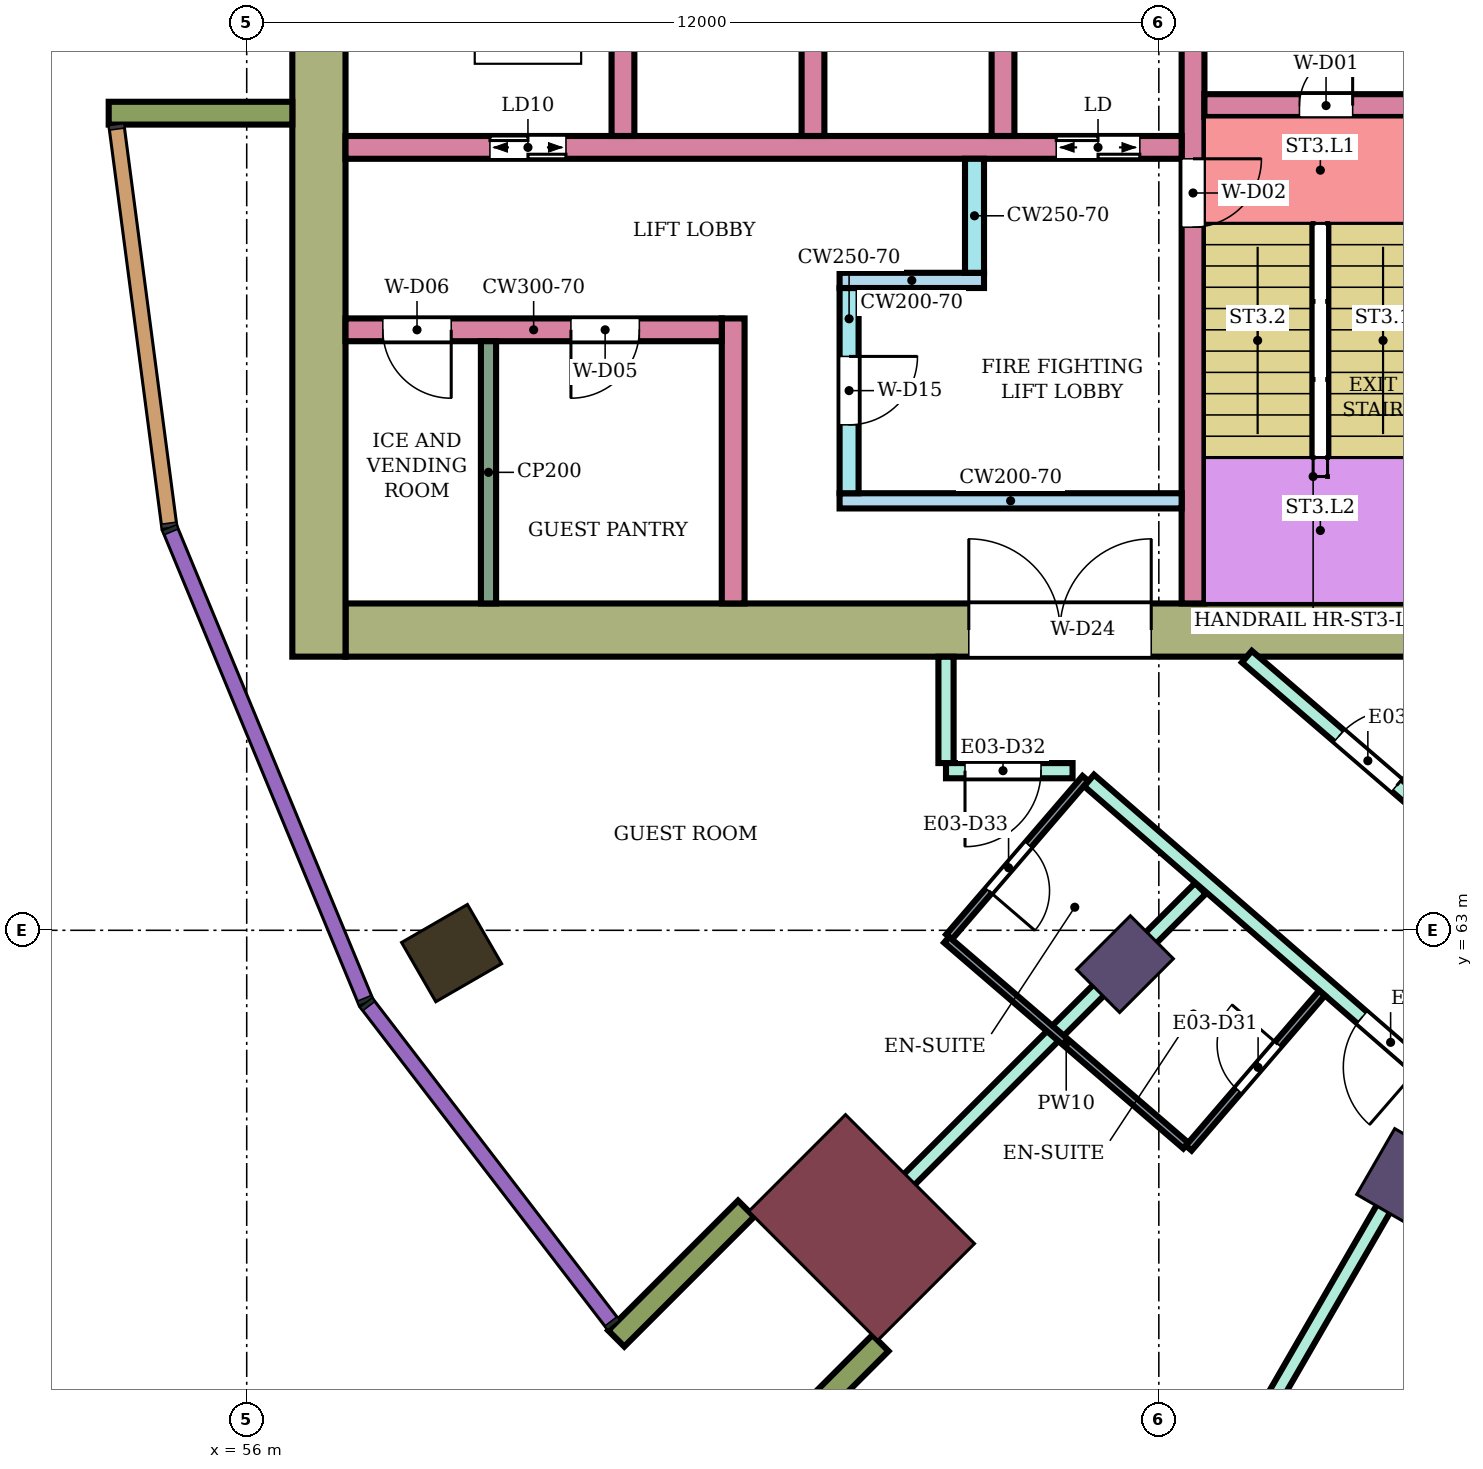
"""IFC4 building model, lengths in metres.
Left out: names, types, materials, properties, quantities, classifications, styles, units other than length and angle.
Written with IfcOpenShell. Run it as: python <this file> out.ifc"""

import sys

from ifc_helpers import new_model, si_unit, direction, frame, frame_2d, origin, origin_2d, place, context, subcontext, project, spatial, rectangle, extrude, element, fill, save


model = new_model("IFC4")
c1 = context("Model", 3, precision=1e-05, world=origin(), true_north=direction((0.0, 1.0)))
c2 = subcontext(c1, "Body", "Model", "MODEL_VIEW")
j1 = project(units=[si_unit("LENGTHUNIT", "METRE"), si_unit("PLANEANGLEUNIT", "RADIAN")], contexts=[c1])
p1 = place(None, origin())
s1 = spatial("IfcSite", under=j1, at=p1, CompositionType="ELEMENT")
p2 = place(p1, origin())
s2 = spatial("IfcBuilding", under=s1, at=p2, CompositionType="ELEMENT")
p3 = place(p2, frame((0.0, 0.0, 141.9)))
s3 = spatial("IfcBuildingStorey", under=s2, at=p3, CompositionType="ELEMENT", Elevation=141.9)
p4 = place(p3, frame((58.696, 62.7, 0.0), z_axis=(0.0, 0.0, 1.0), x_axis=(-0.866025403784, -0.5, 0.0)))
e1 = element("IfcColumn", 1, at=p4, inside=s3, PredefinedType="COLUMN", context=c2, shape_type="SweptSolid", body=[
    extrude(rectangle(XDim=1.0, YDim=0.9, at=origin_2d()), origin(), (0.0, 0.0, 1.0), 3.9),
])
for number, where, z_axis, x_axis in (
    (2, (67.555, 62.555, 0.0), (0.0, 0.0, 1.0), (-0.707, -0.707, 0.0)),
    (3, (71.2, 59.758, 0.0), (0.0, 0.0, 1.0), (-0.5, -0.866, 0.0)),
):
    element("IfcColumn", number, at=place(p3, frame(where, z_axis=z_axis, x_axis=x_axis)), inside=s3, PredefinedType="COLUMN", context=c2, shape_type="SweptSolid", body=[
        extrude(rectangle(XDim=1.0, YDim=0.8, at=origin_2d()), origin(), (0.0, 0.0, 1.0), 3.9),
    ])
p5 = place(p3, frame((64.09, 59.09, 0.0), z_axis=(0.0, 0.0, 1.0), x_axis=(-0.707106781187, -0.707106781187, 0.0)))
e4 = element("IfcColumn", 4, at=p5, inside=s3, PredefinedType="COLUMN", context=c2, shape_type="SweptSolid", body=[
    extrude(rectangle(XDim=1.8, YDim=2.4, at=origin_2d()), origin(), (0.0, 0.0, 1.0), 3.9),
])
p6 = place(p3, frame((72.1, 66.95, 0.0), z_axis=(0.0, 0.0, 1.0), x_axis=(-1.0, 0.0, 0.0)))
e5 = element("IfcWall", 5, at=p6, inside=s3, PredefinedType="SHEAR", context=c2, shape_type="SweptSolid", body=[
    extrude(rectangle(XDim=14.8, YDim=0.7, at=frame_2d((7.4, 0.0))), origin(), (0.0, 0.0, 1.0), 3.58),
])
p7 = place(p6, frame((4.2, 0.0, 0.0)))
e6 = element("IfcOpeningElement", 6, at=p7, cuts=e5, PredefinedType="OPENING", context=c2, shape_type="SweptSolid", body=[
    extrude(rectangle(XDim=2.4, YDim=2.4, at=frame_2d((1.2, 1.2))), frame((0.0, 0.36, 0.0), z_axis=(0.0, -1.0, 0.0), x_axis=(1.0, 0.0, 0.0)), (0.0, 0.0, 1.0), 0.72),
])
p8 = place(p3, frame((56.95, 83.4, 0.0), z_axis=(0.0, 0.0, 1.0), x_axis=(0.0, -1.0, 0.0)))
e7 = element("IfcWall", 7, at=p8, inside=s3, PredefinedType="SHEAR", context=c2, shape_type="SweptSolid", body=[
    extrude(rectangle(XDim=16.8, YDim=0.7, at=frame_2d((8.4, 0.0))), origin(), (0.0, 0.0, 1.0), 3.58),
])
p9 = place(p3, frame((68.45, 75.0, 0.0), z_axis=(0.0, 0.0, 1.0), x_axis=(0.0, -1.0, 0.0)))
e8 = element("IfcWall", 8, at=p9, inside=s3, PredefinedType="SHEAR", context=c2, shape_type="SweptSolid", body=[
    extrude(rectangle(XDim=7.7, YDim=0.3, at=frame_2d((3.85, 0.0))), origin(), (0.0, 0.0, 1.0), 3.58),
])
p10 = place(p9, frame((1.85, 0.0, 0.0)))
e9 = element("IfcOpeningElement", 9, at=p10, cuts=e8, PredefinedType="OPENING", context=c2, shape_type="SweptSolid", body=[
    extrude(rectangle(XDim=0.9, YDim=2.1, at=frame_2d((0.45, 1.05))), frame((0.0, 0.16, 0.0), z_axis=(0.0, -1.0, 0.0), x_axis=(1.0, 0.0, 0.0)), (0.0, 0.0, 1.0), 0.32),
])
p11 = place(p3, frame((71.65, 73.85, 0.0), z_axis=(0.0, 0.0, 1.0), x_axis=(-1.0, 0.0, 0.0)))
e10 = element("IfcWall", 10, at=p11, inside=s3, PredefinedType="SHEAR", context=c2, shape_type="SweptSolid", body=[
    extrude(rectangle(XDim=3.05, YDim=0.3, at=frame_2d((1.525, 0.0))), origin(), (0.0, 0.0, 1.0), 3.58),
])
p12 = place(p11, frame((1.1, 0.0, 0.0)))
e11 = element("IfcOpeningElement", 11, at=p12, cuts=e10, PredefinedType="OPENING", context=c2, shape_type="SweptSolid", body=[
    extrude(rectangle(XDim=0.7, YDim=2.0, at=frame_2d((0.35, 1.0))), frame((0.0, 0.16, 0.0), z_axis=(0.0, -1.0, 0.0), x_axis=(1.0, 0.0, 0.0)), (0.0, 0.0, 1.0), 0.32),
])
p13 = place(p3, frame((68.3, 73.3, 0.0), z_axis=(0.0, 0.0, 1.0), x_axis=(-1.0, 0.0, 0.0)))
e12 = element("IfcWall", 12, at=p13, inside=s3, PredefinedType="SHEAR", context=c2, shape_type="SweptSolid", body=[
    extrude(rectangle(XDim=11.0, YDim=0.3, at=frame_2d((5.5, 0.0))), origin(), (0.0, 0.0, 1.0), 3.58),
])
p14 = place(p13, frame((0.55, 0.0, 0.0)))
e13 = element("IfcOpeningElement", 13, at=p14, cuts=e12, PredefinedType="OPENING", context=c2, shape_type="SweptSolid", body=[
    extrude(rectangle(XDim=1.1, YDim=2.1, at=frame_2d((0.55, 1.05))), frame((0.0, 0.16, 0.0), z_axis=(0.0, -1.0, 0.0), x_axis=(1.0, 0.0, 0.0)), (0.0, 0.0, 1.0), 0.32),
])
p15 = place(p13, frame((8.1, 0.0, 0.0)))
e14 = element("IfcOpeningElement", 14, at=p15, cuts=e12, PredefinedType="OPENING", context=c2, shape_type="SweptSolid", body=[
    extrude(rectangle(XDim=1.0, YDim=2.1, at=frame_2d((0.5, 1.05))), frame((0.0, 0.16, 0.0), z_axis=(0.0, -1.0, 0.0), x_axis=(1.0, 0.0, 0.0)), (0.0, 0.0, 1.0), 0.32),
])
for number, where, z_axis, x_axis in (
    (15, (65.95, 76.0, 0.0), (0.0, 0.0, 1.0), (0.0, -1.0, 0.0)),
    (16, (63.45, 76.0, 0.0), (0.0, 0.0, 1.0), (0.0, -1.0, 0.0)),
    (17, (60.95, 76.0, 0.0), (0.0, 0.0, 1.0), (0.0, -1.0, 0.0)),
):
    element("IfcWall", number, at=place(p3, frame(where, z_axis=z_axis, x_axis=x_axis)), inside=s3, PredefinedType="SHEAR", context=c2, shape_type="SweptSolid", body=[
        extrude(rectangle(XDim=2.55, YDim=0.3, at=frame_2d((1.275, 0.0))), origin(), (0.0, 0.0, 1.0), 3.58),
    ])
p16 = place(p3, frame((68.3, 68.65, 0.0), z_axis=(0.0, 0.0, 1.0), x_axis=(-1.0, 0.0, 0.0)))
e18 = element("IfcWall", 18, at=p16, inside=s3, PredefinedType="SHEAR", context=c2, shape_type="SweptSolid", body=[
    extrude(rectangle(XDim=4.5, YDim=0.2, at=frame_2d((2.25, 0.0))), origin(), (0.0, 0.0, 1.0), 3.58),
])
p17 = place(p3, frame((63.925, 71.45, 0.0), z_axis=(0.0, 0.0, 1.0), x_axis=(0.0, -1.0, 0.0)))
e19 = element("IfcWall", 19, at=p17, inside=s3, PredefinedType="SHEAR", context=c2, shape_type="SweptSolid", body=[
    extrude(rectangle(XDim=2.7, YDim=0.25, at=frame_2d((1.35, 0.0))), origin(), (0.0, 0.0, 1.0), 3.58),
])
p18 = place(p17, frame((0.9, 0.0, 0.0)))
e20 = element("IfcOpeningElement", 20, at=p18, cuts=e19, PredefinedType="OPENING", context=c2, shape_type="SweptSolid", body=[
    extrude(rectangle(XDim=0.9, YDim=2.1, at=frame_2d((0.45, 1.05))), frame((0.0, 0.135, 0.0), z_axis=(0.0, -1.0, 0.0), x_axis=(1.0, 0.0, 0.0)), (0.0, 0.0, 1.0), 0.27),
])
p19 = place(p3, frame((65.7, 71.55, 0.0), z_axis=(0.0, 0.0, 1.0), x_axis=(-1.0, 0.0, 0.0)))
e21 = element("IfcWall", 21, at=p19, inside=s3, PredefinedType="SHEAR", context=c2, shape_type="SweptSolid", body=[
    extrude(rectangle(XDim=1.9, YDim=0.2, at=frame_2d((0.95, 0.0))), origin(), (0.0, 0.0, 1.0), 3.58),
])
p20 = place(p3, frame((65.575, 73.15, 0.0), z_axis=(0.0, 0.0, 1.0), x_axis=(0.0, -1.0, 0.0)))
e22 = element("IfcWall", 22, at=p20, inside=s3, PredefinedType="SHEAR", context=c2, shape_type="SweptSolid", body=[
    extrude(rectangle(XDim=1.5, YDim=0.25, at=frame_2d((0.75, 0.0))), origin(), (0.0, 0.0, 1.0), 3.58),
])
p21 = place(p3, frame((62.4, 71.05, 0.0), z_axis=(0.0, 0.0, 1.0), x_axis=(0.0, -1.0, 0.0)))
e23 = element("IfcWall", 23, at=p21, inside=s3, PredefinedType="SHEAR", context=c2, shape_type="SweptSolid", body=[
    extrude(rectangle(XDim=3.75, YDim=0.3, at=frame_2d((1.875, 0.0))), origin(), (0.0, 0.0, 1.0), 3.58),
])
p22 = place(p3, frame((62.25, 70.9, 0.0), z_axis=(0.0, 0.0, 1.0), x_axis=(-1.0, 0.0, 0.0)))
e24 = element("IfcWall", 24, at=p22, inside=s3, PredefinedType="SHEAR", context=c2, shape_type="SweptSolid", body=[
    extrude(rectangle(XDim=4.95, YDim=0.3, at=frame_2d((2.475, 0.0))), origin(), (0.0, 0.0, 1.0), 3.58),
])
p23 = place(p22, frame((1.084, 0.0, 0.0)))
e25 = element("IfcOpeningElement", 25, at=p23, cuts=e24, PredefinedType="OPENING", context=c2, shape_type="SweptSolid", body=[
    extrude(rectangle(XDim=0.9, YDim=2.1, at=frame_2d((0.45, 1.05))), frame((0.0, 0.16, 0.0), z_axis=(0.0, -1.0, 0.0), x_axis=(1.0, 0.0, 0.0)), (0.0, 0.0, 1.0), 0.32),
])
p24 = place(p22, frame((3.56, 0.0, 0.0)))
e26 = element("IfcOpeningElement", 26, at=p24, cuts=e24, PredefinedType="OPENING", context=c2, shape_type="SweptSolid", body=[
    extrude(rectangle(XDim=0.9, YDim=2.1, at=frame_2d((0.45, 1.05))), frame((0.0, 0.16, 0.0), z_axis=(0.0, -1.0, 0.0), x_axis=(1.0, 0.0, 0.0)), (0.0, 0.0, 1.0), 0.32),
])
for number, where, z_axis, x_axis in (
    (27, (56.6, 73.75, 0.0), (0.0, 0.0, 1.0), (-1.0, 0.0, 0.0)),
    (28, (62.57, 59.338, 0.0), (0.0, 0.0, 1.0), (-0.707, -0.707, 0.0)),
    (29, (64.338, 57.57, 0.0), (0.0, 0.0, 1.0), (-0.707, -0.707, 0.0)),
):
    element("IfcWall", number, at=place(p3, frame(where, z_axis=z_axis, x_axis=x_axis)), inside=s3, PredefinedType="NOTDEFINED", context=c2, shape_type="SweptSolid", body=[
        extrude(rectangle(XDim=2.416, YDim=0.3, at=frame_2d((1.208, 0.0))), origin(), (0.0, 0.0, 1.0), 3.9),
    ])
p25 = place(p3, frame((63.593, 58.599, 0.0), z_axis=(0.0, 0.0, 1.0), x_axis=(0.707228748718, 0.706984792613, 0.0)))
e30 = element("IfcWall", 30, at=p25, inside=s3, PredefinedType="PARTITIONING", context=c2, shape_type="SweptSolid", body=[
    extrude(rectangle(XDim=7.005, YDim=0.2, at=frame_2d((3.503, 0.0))), origin(), (0.0, 0.0, 1.0), 3.45),
])
p26 = place(p3, frame((65.2, 65.2, 0.0), z_axis=(0.0, 0.0, 1.0), x_axis=(0.0, 1.0, 0.0)))
e31 = element("IfcWall", 31, at=p26, inside=s3, PredefinedType="PARTITIONING", context=c2, shape_type="SweptSolid", body=[
    extrude(rectangle(XDim=1.399, YDim=0.2, at=frame_2d((0.7, 0.0))), origin(), (0.0, 0.0, 1.0), 3.45),
])
p27 = place(p3, frame((65.2, 65.1, 0.0), z_axis=(0.0, 0.0, 1.0), x_axis=(1.0, 0.0, 0.0)))
e32 = element("IfcWall", 32, at=p27, inside=s3, PredefinedType="PARTITIONING", context=c2, shape_type="SweptSolid", body=[
    extrude(rectangle(XDim=1.665, YDim=0.2, at=frame_2d((0.833, 0.0))), origin(), (0.0, 0.0, 1.0), 3.45),
])
p28 = place(p27, frame((0.25, 0.0, 0.0)))
e33 = element("IfcOpeningElement", 33, at=p28, cuts=e32, PredefinedType="OPENING", context=c2, shape_type="SweptSolid", body=[
    extrude(rectangle(XDim=1.0, YDim=2.1, at=frame_2d((0.5, 1.05))), frame((0.0, 0.11, 0.0), z_axis=(0.0, -1.0, 0.0), x_axis=(1.0, 0.0, 0.0)), (0.0, 0.0, 1.0), 0.22),
])
p29 = place(p3, frame((67.082, 64.972, 0.0), z_axis=(0.0, 0.0, 1.0), x_axis=(0.755031061605, -0.65568902386, 0.0)))
e34 = element("IfcWall", 34, at=p29, inside=s3, PredefinedType="PARTITIONING", context=c2, shape_type="SweptSolid", body=[
    extrude(rectangle(XDim=6.186, YDim=0.2, at=frame_2d((3.093, 0.0))), origin(), (0.0, 0.0, 1.0), 3.45),
])
p30 = place(p29, frame((4.755, 0.0, 0.0)))
e35 = element("IfcOpeningElement", 35, at=p30, cuts=e34, PredefinedType="OPENING", context=c2, shape_type="SweptSolid", body=[
    extrude(rectangle(XDim=1.0, YDim=2.1, at=frame_2d((0.5, 1.05))), frame((0.0, 0.11, 0.0), z_axis=(0.0, -1.0, 0.0), x_axis=(1.0, 0.0, 0.0)), (0.0, 0.0, 1.0), 0.22),
])
p31 = place(p3, frame((67.097, 52.661, 0.0), z_axis=(0.0, 0.0, 1.0), x_axis=(0.500236379769, 0.865888886841, 0.0)))
e36 = element("IfcWall", 36, at=p31, inside=s3, PredefinedType="PARTITIONING", context=c2, shape_type="SweptSolid", body=[
    extrude(rectangle(XDim=9.375, YDim=0.2, at=frame_2d((4.688, 0.0))), origin(), (0.0, 0.0, 1.0), 3.45),
])
p32 = place(p3, frame((69.158, 66.6, 0.0), z_axis=(0.0, 0.0, 1.0), x_axis=(0.757976058094, -0.652282373943, 0.0)))
e37 = element("IfcWall", 37, at=p32, inside=s3, PredefinedType="PARTITIONING", context=c2, shape_type="SweptSolid", body=[
    extrude(rectangle(XDim=5.16, YDim=0.2, at=frame_2d((2.58, 0.0))), origin(), (0.0, 0.0, 1.0), 3.45),
])
p33 = place(p32, frame((1.6, 0.0, 0.0)))
e38 = element("IfcOpeningElement", 38, at=p33, cuts=e37, PredefinedType="OPENING", context=c2, shape_type="SweptSolid", body=[
    extrude(rectangle(XDim=1.0, YDim=2.1, at=frame_2d((0.5, 1.05))), frame((0.0, 0.11, 0.0), z_axis=(0.0, -1.0, 0.0), x_axis=(1.0, 0.0, 0.0)), (0.0, 0.0, 1.0), 0.22),
])
p34 = place(p3, frame((65.24, 62.913, 0.0), z_axis=(0.0, 0.0, 1.0), x_axis=(0.652069888227, 0.758158862553, 0.0)))
e39 = element("IfcWall", 39, at=p34, inside=s3, PredefinedType="PARTITIONING", context=c2, shape_type="SweptSolid", body=[
    extrude(rectangle(XDim=2.75, YDim=0.1, at=frame_2d((1.375, 0.0))), origin(), (0.0, 0.0, 1.0), 3.45),
])
p35 = place(p34, frame((0.8, 0.0, 0.0)))
e40 = element("IfcOpeningElement", 40, at=p35, cuts=e39, PredefinedType="OPENING", context=c2, shape_type="SweptSolid", body=[
    extrude(rectangle(XDim=0.8, YDim=2.1, at=frame_2d((0.4, 1.05))), frame((0.0, 0.06, 0.0), z_axis=(0.0, -1.0, 0.0), x_axis=(1.0, 0.0, 0.0)), (0.0, 0.0, 1.0), 0.12),
])
p36 = place(p3, frame((65.208, 62.875, 0.0), z_axis=(0.0, 0.0, 1.0), x_axis=(0.757943251005, -0.652320495045, 0.0)))
e41 = element("IfcWall", 41, at=p36, inside=s3, PredefinedType="PARTITIONING", context=c2, shape_type="SweptSolid", body=[
    extrude(rectangle(XDim=4.151, YDim=0.1, at=frame_2d((2.076, 0.0))), origin(), (0.0, 0.0, 1.0), 3.45),
])
p37 = place(p3, frame((68.393, 60.135, 0.0), z_axis=(0.0, 0.0, 1.0), x_axis=(0.652061182569, 0.758166349944, 0.0)))
e42 = element("IfcWall", 42, at=p37, inside=s3, PredefinedType="PARTITIONING", context=c2, shape_type="SweptSolid", body=[
    extrude(rectangle(XDim=2.69, YDim=0.1, at=frame_2d((1.345, 0.0))), origin(), (0.0, 0.0, 1.0), 3.45),
])
p38 = place(p37, frame((1.0, 0.0, 0.0)))
e43 = element("IfcOpeningElement", 43, at=p38, cuts=e42, PredefinedType="OPENING", context=c2, shape_type="SweptSolid", body=[
    extrude(rectangle(XDim=0.8, YDim=2.1, at=frame_2d((0.4, 1.05))), frame((0.0, 0.06, 0.0), z_axis=(0.0, -1.0, 0.0), x_axis=(1.0, 0.0, 0.0)), (0.0, 0.0, 1.0), 0.12),
])
p39 = place(p3, frame((59.181, 70.75, 0.0), z_axis=(0.0, 0.0, 1.0), x_axis=(0.0, -1.0, 0.0)))
e44 = element("IfcWall", 44, at=p39, inside=s3, PredefinedType="PARTITIONING", context=c2, shape_type="SweptSolid", body=[
    extrude(rectangle(XDim=3.45, YDim=0.2, at=frame_2d((1.725, 0.0))), origin(), (0.0, 0.0, 1.0), 3.58),
])
p40 = place(p30, frame((1.0, 0.0, 0.0), z_axis=(0.0, 0.0, 1.0), x_axis=(-1.0, 0.0, 0.0)))
e45 = element("IfcDoor", 45, at=p40, inside=s3, OperationType="SINGLE_SWING_LEFT", PredefinedType="DOOR", context=c2, shape_type="SweptSolid", body=[
    extrude(rectangle(XDim=1.0, YDim=2.1, at=frame_2d((0.5, 1.05))), frame((0.0, 0.025, 0.0), z_axis=(0.0, -1.0, 0.0), x_axis=(1.0, 0.0, 0.0)), (0.0, 0.0, 1.0), 0.05),
])
fill(e35, e45)
p41 = place(p38, origin())
e46 = element("IfcDoor", 46, at=p41, inside=s3, OperationType="SINGLE_SWING_RIGHT", PredefinedType="DOOR", context=c2, shape_type="SweptSolid", body=[
    extrude(rectangle(XDim=0.8, YDim=2.1, at=frame_2d((0.4, 1.05))), frame((0.0, 0.025, 0.0), z_axis=(0.0, -1.0, 0.0), x_axis=(1.0, 0.0, 0.0)), (0.0, 0.0, 1.0), 0.05),
])
fill(e43, e46)
p42 = place(p28, frame((1.0, 0.0, 0.0), z_axis=(0.0, 0.0, 1.0), x_axis=(-1.0, 0.0, 0.0)))
e47 = element("IfcDoor", 47, at=p42, inside=s3, OperationType="SINGLE_SWING_RIGHT", PredefinedType="DOOR", context=c2, shape_type="SweptSolid", body=[
    extrude(rectangle(XDim=1.0, YDim=2.1, at=frame_2d((0.5, 1.05))), frame((0.0, 0.025, 0.0), z_axis=(0.0, -1.0, 0.0), x_axis=(1.0, 0.0, 0.0)), (0.0, 0.0, 1.0), 0.05),
])
fill(e33, e47)
p43 = place(p35, frame((0.8, 0.0, 0.0), z_axis=(0.0, 0.0, 1.0), x_axis=(-1.0, 0.0, 0.0)))
e48 = element("IfcDoor", 48, at=p43, inside=s3, OperationType="SINGLE_SWING_RIGHT", PredefinedType="DOOR", context=c2, shape_type="SweptSolid", body=[
    extrude(rectangle(XDim=0.8, YDim=2.1, at=frame_2d((0.4, 1.05))), frame((0.0, 0.025, 0.0), z_axis=(0.0, -1.0, 0.0), x_axis=(1.0, 0.0, 0.0)), (0.0, 0.0, 1.0), 0.05),
])
fill(e40, e48)
p44 = place(p33, origin())
e49 = element("IfcDoor", 49, at=p44, inside=s3, OperationType="SINGLE_SWING_RIGHT", PredefinedType="DOOR", context=c2, shape_type="SweptSolid", body=[
    extrude(rectangle(XDim=1.0, YDim=2.1, at=frame_2d((0.5, 1.05))), frame((0.0, 0.025, 0.0), z_axis=(0.0, -1.0, 0.0), x_axis=(1.0, 0.0, 0.0)), (0.0, 0.0, 1.0), 0.05),
])
fill(e38, e49)
p45 = place(p12, frame((0.7, 0.0, 0.0), z_axis=(0.0, 0.0, 1.0), x_axis=(-1.0, 0.0, 0.0)))
e50 = element("IfcDoor", 50, at=p45, inside=s3, OperationType="SINGLE_SWING_RIGHT", PredefinedType="DOOR", context=c2, shape_type="SweptSolid", body=[
    extrude(rectangle(XDim=0.7, YDim=2.0, at=frame_2d((0.35, 1.0))), frame((0.0, 0.025, 0.0), z_axis=(0.0, -1.0, 0.0), x_axis=(1.0, 0.0, 0.0)), (0.0, 0.0, 1.0), 0.05),
])
fill(e11, e50)
p46 = place(p10, origin())
e51 = element("IfcDoor", 51, at=p46, inside=s3, OperationType="SINGLE_SWING_LEFT", PredefinedType="DOOR", context=c2, shape_type="SweptSolid", body=[
    extrude(rectangle(XDim=0.9, YDim=2.1, at=frame_2d((0.45, 1.05))), frame((0.0, 0.025, 0.0), z_axis=(0.0, -1.0, 0.0), x_axis=(1.0, 0.0, 0.0)), (0.0, 0.0, 1.0), 0.05),
])
fill(e9, e51)
p47 = place(p14, origin())
e52 = element("IfcDoor", 52, at=p47, inside=s3, OperationType="DOUBLE_DOOR_SLIDING", PredefinedType="DOOR", context=c2, shape_type="SweptSolid", body=[
    extrude(rectangle(XDim=1.1, YDim=2.1, at=frame_2d((0.55, 1.05))), frame((0.0, 0.025, 0.0), z_axis=(0.0, -1.0, 0.0), x_axis=(1.0, 0.0, 0.0)), (0.0, 0.0, 1.0), 0.05),
])
fill(e13, e52)
p48 = place(p15, origin())
e53 = element("IfcDoor", 53, at=p48, inside=s3, OperationType="DOUBLE_DOOR_SLIDING", PredefinedType="DOOR", context=c2, shape_type="SweptSolid", body=[
    extrude(rectangle(XDim=1.0, YDim=2.1, at=frame_2d((0.5, 1.05))), frame((0.0, 0.025, 0.0), z_axis=(0.0, -1.0, 0.0), x_axis=(1.0, 0.0, 0.0)), (0.0, 0.0, 1.0), 0.05),
])
fill(e14, e53)
p49 = place(p18, origin())
e54 = element("IfcDoor", 54, at=p49, inside=s3, OperationType="SINGLE_SWING_LEFT", PredefinedType="DOOR", context=c2, shape_type="SweptSolid", body=[
    extrude(rectangle(XDim=0.9, YDim=2.1, at=frame_2d((0.45, 1.05))), frame((0.0, 0.025, 0.0), z_axis=(0.0, -1.0, 0.0), x_axis=(1.0, 0.0, 0.0)), (0.0, 0.0, 1.0), 0.05),
])
fill(e20, e54)
p50 = place(p23, origin())
e55 = element("IfcDoor", 55, at=p50, inside=s3, OperationType="SINGLE_SWING_RIGHT", PredefinedType="DOOR", context=c2, shape_type="SweptSolid", body=[
    extrude(rectangle(XDim=0.9, YDim=2.1, at=frame_2d((0.45, 1.05))), frame((0.0, 0.025, 0.0), z_axis=(0.0, -1.0, 0.0), x_axis=(1.0, 0.0, 0.0)), (0.0, 0.0, 1.0), 0.05),
])
fill(e25, e55)
p51 = place(p24, origin())
e56 = element("IfcDoor", 56, at=p51, inside=s3, OperationType="SINGLE_SWING_LEFT", PredefinedType="DOOR", context=c2, shape_type="SweptSolid", body=[
    extrude(rectangle(XDim=0.9, YDim=2.1, at=frame_2d((0.45, 1.05))), frame((0.0, 0.025, 0.0), z_axis=(0.0, -1.0, 0.0), x_axis=(1.0, 0.0, 0.0)), (0.0, 0.0, 1.0), 0.05),
])
fill(e26, e56)
p52 = place(p7, frame((2.4, 0.0, 0.0), z_axis=(0.0, 0.0, 1.0), x_axis=(-1.0, 0.0, 0.0)))
e57 = element("IfcDoor", 57, at=p52, inside=s3, OperationType="DOUBLE_DOOR_SINGLE_SWING", PredefinedType="DOOR", context=c2, shape_type="SweptSolid", body=[
    extrude(rectangle(XDim=2.4, YDim=2.4, at=frame_2d((1.2, 1.2))), frame((0.0, 0.025, 0.0), z_axis=(0.0, -1.0, 0.0), x_axis=(1.0, 0.0, 0.0)), (0.0, 0.0, 1.0), 0.05),
])
fill(e6, e57)
save(model, sys.argv[1])
